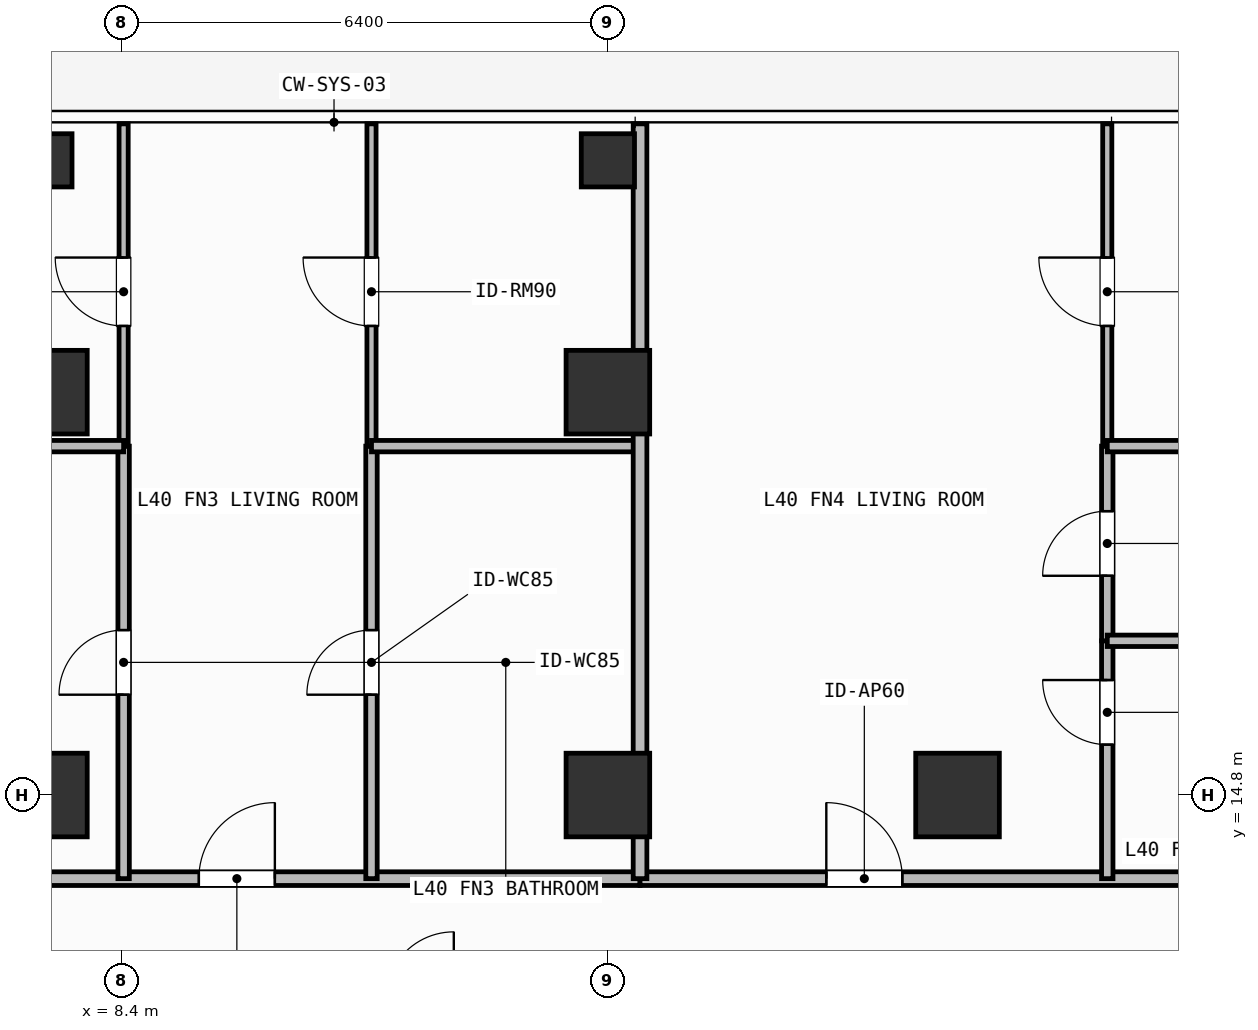
"""IFC4 building model, lengths in metres.
Left out: names, types, materials, properties, quantities, classifications, styles, units other than length and angle.
Written with IfcOpenShell. Run it as: python <this file> out.ifc"""

import sys

from ifc_helpers import new_model, si_unit, direction, frame, frame_2d, origin, origin_2d, place, context, subcontext, project, spatial, rectangle, hollow_rectangle, extrude, element, fill, save


model = new_model("IFC4")
c1 = context("Model", 3, precision=1e-05, world=origin(), true_north=direction((0.0, 1.0)))
c2 = subcontext(c1, "Body", "Model", "MODEL_VIEW")
j1 = project(units=[si_unit("LENGTHUNIT", "METRE"), si_unit("PLANEANGLEUNIT", "RADIAN")], contexts=[c1])
p1 = place(None, origin())
s1 = spatial("IfcSite", under=j1, at=p1, CompositionType="ELEMENT")
p2 = place(p1, origin())
s2 = spatial("IfcBuilding", under=s1, at=p2, CompositionType="ELEMENT")
p3 = place(p2, frame((0.0, 0.0, 164.1)))
s3 = spatial("IfcBuildingStorey", under=s2, at=p3, CompositionType="ELEMENT", Elevation=164.1)
for number, where, z_axis, x_axis in (
    (1, (7.4, 14.8, 0.0), (0.0, 0.0, 1.0), (1.0, 0.0, 0.0)),
    (2, (14.8, 14.8, 0.0), (0.0, 0.0, 1.0), (1.0, 0.0, 0.0)),
    (3, (19.4, 14.8, 0.0), (0.0, 0.0, 1.0), (1.0, 0.0, 0.0)),
    (4, (7.4, 20.1, 0.0), (0.0, 0.0, 1.0), (1.0, 0.0, 0.0)),
    (5, (14.8, 20.1, 0.0), (0.0, 0.0, 1.0), (1.0, 0.0, 0.0)),
):
    element("IfcColumn", number, at=place(p3, frame(where, z_axis=z_axis, x_axis=x_axis)), inside=s3, PredefinedType="COLUMN", context=c2, shape_type="SweptSolid", body=[
        extrude(rectangle(XDim=1.1, YDim=1.1, at=origin_2d()), origin(), (0.0, 0.0, 1.0), 3.9),
    ])
for number, where, z_axis, x_axis in (
    (6, (7.4, 23.15, 0.0), (0.0, 0.0, 1.0), (1.0, 0.0, 0.0)),
    (7, (14.8, 23.15, 0.0), (0.0, 0.0, 1.0), (1.0, 0.0, 0.0)),
):
    element("IfcColumn", number, at=place(p3, frame(where, z_axis=z_axis, x_axis=x_axis)), inside=s3, PredefinedType="COLUMN", context=c2, shape_type="SweptSolid", body=[
        extrude(hollow_rectangle(XDim=0.7, YDim=0.7, WallThickness=0.032, at=origin_2d()), origin(), (0.0, 0.0, 1.0), 3.9),
    ])
p4 = place(p3, frame((3.9, 13.7, 0.0), z_axis=(0.0, 0.0, 1.0), x_axis=(1.0, 0.0, 0.0)))
e8 = element("IfcWall", 8, at=p4, inside=s3, PredefinedType="PARTITIONING", context=c2, shape_type="SweptSolid", body=[
    extrude(rectangle(XDim=11.323, YDim=0.18, at=frame_2d((5.662, 0.0))), origin(), (0.0, 0.0, 1.0), 3.62),
])
p5 = place(p4, frame((5.519, 0.0, 0.0)))
e9 = element("IfcOpeningElement", 9, at=p5, cuts=e8, PredefinedType="OPENING", context=c2, shape_type="SweptSolid", body=[
    extrude(rectangle(XDim=1.0, YDim=2.2, at=frame_2d((0.5, 1.1))), frame((0.0, 0.1, 0.0), z_axis=(0.0, -1.0, 0.0), x_axis=(1.0, 0.0, 0.0)), (0.0, 0.0, 1.0), 0.2),
])
p6 = place(p3, frame((8.429, 13.7, 0.0), z_axis=(0.0, 0.0, 1.0), x_axis=(0.0, 1.0, 0.0)))
e10 = element("IfcWall", 10, at=p6, inside=s3, PredefinedType="PARTITIONING", context=c2, shape_type="SweptSolid", body=[
    extrude(rectangle(XDim=5.69, YDim=0.15, at=frame_2d((2.845, 0.0))), origin(), (0.0, 0.0, 1.0), 3.62),
])
p7 = place(p6, frame((2.42, 0.0, 0.0)))
e11 = element("IfcOpeningElement", 11, at=p7, cuts=e10, PredefinedType="OPENING", context=c2, shape_type="SweptSolid", body=[
    extrude(rectangle(XDim=0.85, YDim=2.1, at=frame_2d((0.425, 1.05))), frame((0.0, 0.085, 0.0), z_axis=(0.0, -1.0, 0.0), x_axis=(1.0, 0.0, 0.0)), (0.0, 0.0, 1.0), 0.17),
])
p8 = place(p3, frame((8.429, 19.39, 0.0), z_axis=(0.0, 0.0, 1.0), x_axis=(0.0, 1.0, 0.0)))
e12 = element("IfcWall", 12, at=p8, inside=s3, PredefinedType="PARTITIONING", context=c2, shape_type="SweptSolid", body=[
    extrude(rectangle(XDim=4.24, YDim=0.12, at=frame_2d((2.12, 0.0))), origin(), (0.0, 0.0, 1.0), 3.62),
])
p9 = place(p8, frame((1.581, 0.0, 0.0)))
e13 = element("IfcOpeningElement", 13, at=p9, cuts=e12, PredefinedType="OPENING", context=c2, shape_type="SweptSolid", body=[
    extrude(rectangle(XDim=0.9, YDim=2.1, at=frame_2d((0.45, 1.05))), frame((0.0, 0.07, 0.0), z_axis=(0.0, -1.0, 0.0), x_axis=(1.0, 0.0, 0.0)), (0.0, 0.0, 1.0), 0.14),
])
p10 = place(p3, frame((11.69, 13.7, 0.0), z_axis=(0.0, 0.0, 1.0), x_axis=(0.0, 1.0, 0.0)))
e14 = element("IfcWall", 14, at=p10, inside=s3, PredefinedType="PARTITIONING", context=c2, shape_type="SweptSolid", body=[
    extrude(rectangle(XDim=5.69, YDim=0.15, at=frame_2d((2.845, 0.0))), origin(), (0.0, 0.0, 1.0), 3.62),
])
p11 = place(p10, frame((2.42, 0.0, 0.0)))
e15 = element("IfcOpeningElement", 15, at=p11, cuts=e14, PredefinedType="OPENING", context=c2, shape_type="SweptSolid", body=[
    extrude(rectangle(XDim=0.85, YDim=2.1, at=frame_2d((0.425, 1.05))), frame((0.0, 0.085, 0.0), z_axis=(0.0, -1.0, 0.0), x_axis=(1.0, 0.0, 0.0)), (0.0, 0.0, 1.0), 0.17),
])
p12 = place(p3, frame((11.69, 19.39, 0.0), z_axis=(0.0, 0.0, 1.0), x_axis=(0.0, 1.0, 0.0)))
e16 = element("IfcWall", 16, at=p12, inside=s3, PredefinedType="PARTITIONING", context=c2, shape_type="SweptSolid", body=[
    extrude(rectangle(XDim=4.24, YDim=0.12, at=frame_2d((2.12, 0.0))), origin(), (0.0, 0.0, 1.0), 3.62),
])
p13 = place(p12, frame((1.581, 0.0, 0.0)))
e17 = element("IfcOpeningElement", 17, at=p13, cuts=e16, PredefinedType="OPENING", context=c2, shape_type="SweptSolid", body=[
    extrude(rectangle(XDim=0.9, YDim=2.1, at=frame_2d((0.45, 1.05))), frame((0.0, 0.07, 0.0), z_axis=(0.0, -1.0, 0.0), x_axis=(1.0, 0.0, 0.0)), (0.0, 0.0, 1.0), 0.14),
])
p14 = place(p3, frame((15.223, 13.7, 0.0), z_axis=(0.0, 0.0, 1.0), x_axis=(1.0, 0.0, 0.0)))
e18 = element("IfcWall", 18, at=p14, inside=s3, PredefinedType="PARTITIONING", context=c2, shape_type="SweptSolid", body=[
    extrude(rectangle(XDim=8.897, YDim=0.18, at=frame_2d((4.449, 0.0))), origin(), (0.0, 0.0, 1.0), 3.62),
])
p15 = place(p14, frame((2.451, 0.0, 0.0)))
e19 = element("IfcOpeningElement", 19, at=p15, cuts=e18, PredefinedType="OPENING", context=c2, shape_type="SweptSolid", body=[
    extrude(rectangle(XDim=1.0, YDim=2.2, at=frame_2d((0.5, 1.1))), frame((0.0, 0.1, 0.0), z_axis=(0.0, -1.0, 0.0), x_axis=(1.0, 0.0, 0.0)), (0.0, 0.0, 1.0), 0.2),
])
p16 = place(p3, frame((21.37, 13.7, 0.0), z_axis=(0.0, 0.0, 1.0), x_axis=(0.0, 1.0, 0.0)))
e20 = element("IfcWall", 20, at=p16, inside=s3, PredefinedType="PARTITIONING", context=c2, shape_type="SweptSolid", body=[
    extrude(rectangle(XDim=3.129, YDim=0.15, at=frame_2d((1.564, 0.0))), origin(), (0.0, 0.0, 1.0), 3.16),
])
p17 = place(p16, frame((1.763, 0.0, 0.0)))
e21 = element("IfcOpeningElement", 21, at=p17, cuts=e20, PredefinedType="OPENING", context=c2, shape_type="SweptSolid", body=[
    extrude(rectangle(XDim=0.85, YDim=2.1, at=frame_2d((0.425, 1.05))), frame((0.0, 0.085, 0.0), z_axis=(0.0, -1.0, 0.0), x_axis=(1.0, 0.0, 0.0)), (0.0, 0.0, 1.0), 0.17),
])
p18 = place(p3, frame((21.37, 16.829, 0.0), z_axis=(0.0, 0.0, 1.0), x_axis=(0.0, 1.0, 0.0)))
e22 = element("IfcWall", 22, at=p18, inside=s3, PredefinedType="PARTITIONING", context=c2, shape_type="SweptSolid", body=[
    extrude(rectangle(XDim=2.561, YDim=0.15, at=frame_2d((1.28, 0.0))), origin(), (0.0, 0.0, 1.0), 3.16),
])
p19 = place(p18, frame((0.855, 0.0, 0.0)))
e23 = element("IfcOpeningElement", 23, at=p19, cuts=e22, PredefinedType="OPENING", context=c2, shape_type="SweptSolid", body=[
    extrude(rectangle(XDim=0.85, YDim=2.1, at=frame_2d((0.425, 1.05))), frame((0.0, 0.085, 0.0), z_axis=(0.0, -1.0, 0.0), x_axis=(1.0, 0.0, 0.0)), (0.0, 0.0, 1.0), 0.17),
])
p20 = place(p3, frame((21.37, 19.39, 0.0), z_axis=(0.0, 0.0, 1.0), x_axis=(0.0, 1.0, 0.0)))
e24 = element("IfcWall", 24, at=p20, inside=s3, PredefinedType="PARTITIONING", context=c2, shape_type="SweptSolid", body=[
    extrude(rectangle(XDim=4.24, YDim=0.12, at=frame_2d((2.12, 0.0))), origin(), (0.0, 0.0, 1.0), 3.62),
])
p21 = place(p20, frame((1.581, 0.0, 0.0)))
e25 = element("IfcOpeningElement", 25, at=p21, cuts=e24, PredefinedType="OPENING", context=c2, shape_type="SweptSolid", body=[
    extrude(rectangle(XDim=0.9, YDim=2.1, at=frame_2d((0.45, 1.05))), frame((0.0, 0.07, 0.0), z_axis=(0.0, -1.0, 0.0), x_axis=(1.0, 0.0, 0.0)), (0.0, 0.0, 1.0), 0.14),
])
p22 = place(p3, frame((3.9, 19.39, 0.0), z_axis=(0.0, 0.0, 1.0), x_axis=(1.0, 0.0, 0.0)))
e26 = element("IfcWall", 26, at=p22, inside=s3, PredefinedType="PARTITIONING", context=c2, shape_type="SweptSolid", body=[
    extrude(rectangle(XDim=4.529, YDim=0.15, at=frame_2d((2.265, 0.0))), origin(), (0.0, 0.0, 1.0), 3.62),
])
p23 = place(p3, frame((11.69, 19.39, 0.0), z_axis=(0.0, 0.0, 1.0), x_axis=(1.0, 0.0, 0.0)))
e27 = element("IfcWall", 27, at=p23, inside=s3, PredefinedType="PARTITIONING", context=c2, shape_type="SweptSolid", body=[
    extrude(rectangle(XDim=3.533, YDim=0.15, at=frame_2d((1.767, 0.0))), origin(), (0.0, 0.0, 1.0), 3.62),
])
for number, where, z_axis, x_axis in (
    (28, (21.37, 16.829, 0.0), (0.0, 0.0, 1.0), (1.0, 0.0, 0.0)),
    (29, (21.37, 19.39, 0.0), (0.0, 0.0, 1.0), (1.0, 0.0, 0.0)),
):
    element("IfcWall", number, at=place(p3, frame(where, z_axis=z_axis, x_axis=x_axis)), inside=s3, PredefinedType="PARTITIONING", context=c2, shape_type="SweptSolid", body=[
        extrude(rectangle(XDim=2.75, YDim=0.15, at=frame_2d((1.375, 0.0))), origin(), (0.0, 0.0, 1.0), 3.62),
    ])
p24 = place(p3, frame((15.223, 13.7, 0.0), z_axis=(0.0, 0.0, 1.0), x_axis=(0.0, 1.0, 0.0)))
e30 = element("IfcWall", 30, at=p24, inside=s3, PredefinedType="PARTITIONING", context=c2, shape_type="SweptSolid", body=[
    extrude(rectangle(XDim=9.93, YDim=0.18, at=frame_2d((4.965, 0.0))), origin(), (0.0, 0.0, 1.0), 3.62),
])
p25 = place(p5, origin())
e31 = element("IfcDoor", 31, at=p25, inside=s3, OperationType="SINGLE_SWING_RIGHT", PredefinedType="DOOR", context=c2, shape_type="SweptSolid", body=[
    extrude(rectangle(XDim=1.0, YDim=2.2, at=frame_2d((0.5, 1.1))), frame((0.0, 0.025, 0.0), z_axis=(0.0, -1.0, 0.0), x_axis=(1.0, 0.0, 0.0)), (0.0, 0.0, 1.0), 0.05),
])
fill(e9, e31)
p26 = place(p7, origin())
e32 = element("IfcDoor", 32, at=p26, inside=s3, OperationType="SINGLE_SWING_LEFT", PredefinedType="DOOR", context=c2, shape_type="SweptSolid", body=[
    extrude(rectangle(XDim=0.85, YDim=2.1, at=frame_2d((0.425, 1.05))), frame((0.0, 0.025, 0.0), z_axis=(0.0, -1.0, 0.0), x_axis=(1.0, 0.0, 0.0)), (0.0, 0.0, 1.0), 0.05),
])
fill(e11, e32)
p27 = place(p9, origin())
e33 = element("IfcDoor", 33, at=p27, inside=s3, OperationType="SINGLE_SWING_RIGHT", PredefinedType="DOOR", context=c2, shape_type="SweptSolid", body=[
    extrude(rectangle(XDim=0.9, YDim=2.1, at=frame_2d((0.45, 1.05))), frame((0.0, 0.025, 0.0), z_axis=(0.0, -1.0, 0.0), x_axis=(1.0, 0.0, 0.0)), (0.0, 0.0, 1.0), 0.05),
])
fill(e13, e33)
p28 = place(p11, origin())
e34 = element("IfcDoor", 34, at=p28, inside=s3, OperationType="SINGLE_SWING_LEFT", PredefinedType="DOOR", context=c2, shape_type="SweptSolid", body=[
    extrude(rectangle(XDim=0.85, YDim=2.1, at=frame_2d((0.425, 1.05))), frame((0.0, 0.025, 0.0), z_axis=(0.0, -1.0, 0.0), x_axis=(1.0, 0.0, 0.0)), (0.0, 0.0, 1.0), 0.05),
])
fill(e15, e34)
p29 = place(p13, origin())
e35 = element("IfcDoor", 35, at=p29, inside=s3, OperationType="SINGLE_SWING_RIGHT", PredefinedType="DOOR", context=c2, shape_type="SweptSolid", body=[
    extrude(rectangle(XDim=0.9, YDim=2.1, at=frame_2d((0.45, 1.05))), frame((0.0, 0.025, 0.0), z_axis=(0.0, -1.0, 0.0), x_axis=(1.0, 0.0, 0.0)), (0.0, 0.0, 1.0), 0.05),
])
fill(e17, e35)
p30 = place(p15, origin())
e36 = element("IfcDoor", 36, at=p30, inside=s3, OperationType="SINGLE_SWING_LEFT", PredefinedType="DOOR", context=c2, shape_type="SweptSolid", body=[
    extrude(rectangle(XDim=1.0, YDim=2.2, at=frame_2d((0.5, 1.1))), frame((0.0, 0.025, 0.0), z_axis=(0.0, -1.0, 0.0), x_axis=(1.0, 0.0, 0.0)), (0.0, 0.0, 1.0), 0.05),
])
fill(e19, e36)
p31 = place(p17, origin())
e37 = element("IfcDoor", 37, at=p31, inside=s3, OperationType="SINGLE_SWING_RIGHT", PredefinedType="DOOR", context=c2, shape_type="SweptSolid", body=[
    extrude(rectangle(XDim=0.85, YDim=2.1, at=frame_2d((0.425, 1.05))), frame((0.0, 0.025, 0.0), z_axis=(0.0, -1.0, 0.0), x_axis=(1.0, 0.0, 0.0)), (0.0, 0.0, 1.0), 0.05),
])
fill(e21, e37)
p32 = place(p19, origin())
e38 = element("IfcDoor", 38, at=p32, inside=s3, OperationType="SINGLE_SWING_LEFT", PredefinedType="DOOR", context=c2, shape_type="SweptSolid", body=[
    extrude(rectangle(XDim=0.85, YDim=2.1, at=frame_2d((0.425, 1.05))), frame((0.0, 0.025, 0.0), z_axis=(0.0, -1.0, 0.0), x_axis=(1.0, 0.0, 0.0)), (0.0, 0.0, 1.0), 0.05),
])
fill(e23, e38)
p33 = place(p21, origin())
e39 = element("IfcDoor", 39, at=p33, inside=s3, OperationType="SINGLE_SWING_RIGHT", PredefinedType="DOOR", context=c2, shape_type="SweptSolid", body=[
    extrude(rectangle(XDim=0.9, YDim=2.1, at=frame_2d((0.45, 1.05))), frame((0.0, 0.025, 0.0), z_axis=(0.0, -1.0, 0.0), x_axis=(1.0, 0.0, 0.0)), (0.0, 0.0, 1.0), 0.05),
])
fill(e25, e39)
save(model, sys.argv[1])
